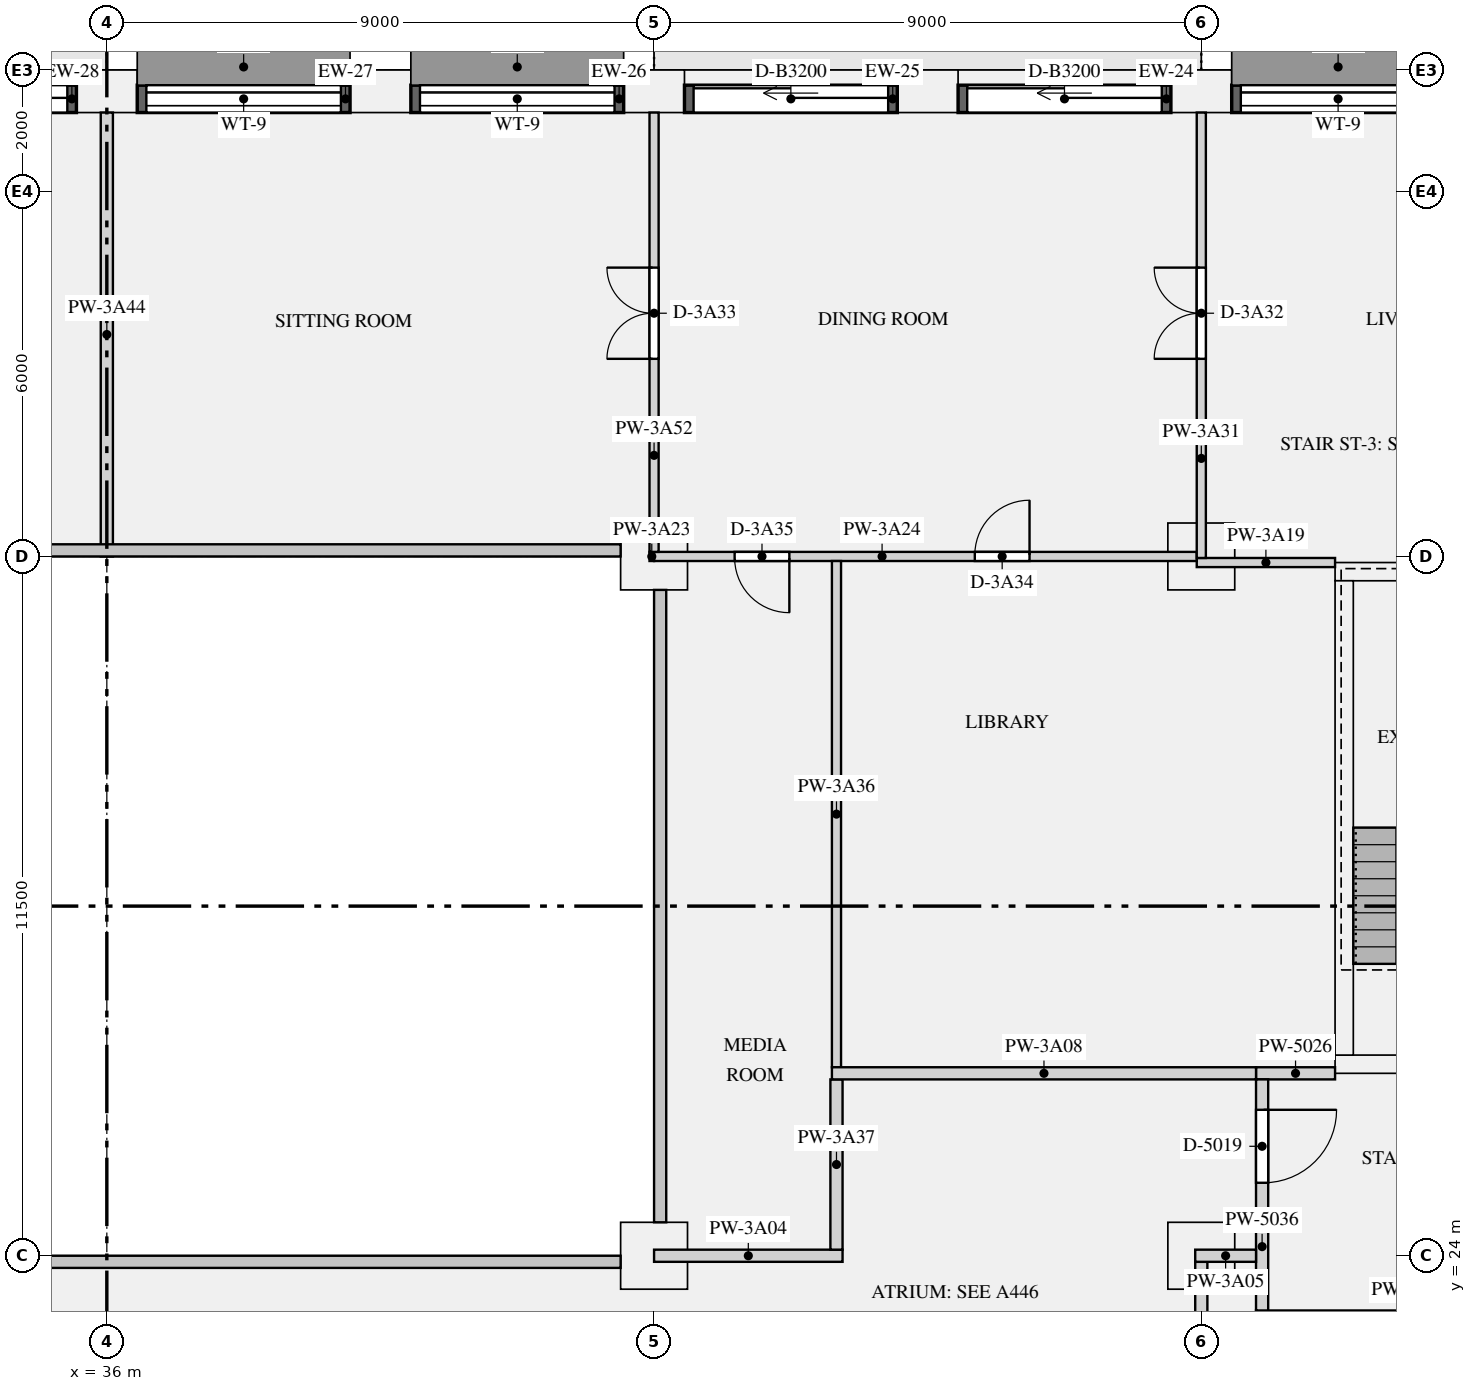
"""IFC4 building model, lengths in metres.
Left out: names, types, materials, properties, quantities, classifications, styles, units other than length and angle.
Written with IfcOpenShell. Run it as: python <this file> out.ifc"""

import sys

from ifc_helpers import new_model, si_unit, direction, frame, frame_2d, origin, origin_2d, place, context, subcontext, project, spatial, rectangle, extrude, element, fill, save


model = new_model("IFC4")
c1 = context("Model", 3, precision=1e-05, world=origin(), true_north=direction((0.0, 1.0)))
c2 = subcontext(c1, "Body", "Model", "MODEL_VIEW")
j1 = project(units=[si_unit("LENGTHUNIT", "METRE"), si_unit("PLANEANGLEUNIT", "RADIAN")], contexts=[c1])
p1 = place(None, origin())
s1 = spatial("IfcSite", under=j1, at=p1, CompositionType="ELEMENT")
p2 = place(p1, origin())
s2 = spatial("IfcBuilding", under=s1, at=p2, CompositionType="ELEMENT")
p3 = place(p2, frame((0.0, 0.0, 144.45)))
s3 = spatial("IfcBuildingStorey", under=s2, at=p3, CompositionType="ELEMENT", Elevation=144.45)
for number, where, z_axis, x_axis in (
    (1, (54.0, 43.15, 0.0), (0.0, 0.0, 1.0), (-1.0, 0.0, 0.0)),
    (2, (49.5, 43.15, 0.0), (0.0, 0.0, 1.0), (-1.0, 0.0, 0.0)),
    (3, (45.0, 43.15, 0.0), (0.0, 0.0, 1.0), (-1.0, 0.0, 0.0)),
    (4, (40.5, 43.15, 0.0), (0.0, 0.0, 1.0), (-1.0, 0.0, 0.0)),
    (5, (36.0, 43.15, 0.0), (0.0, 0.0, 1.0), (-1.0, 0.0, 0.0)),
):
    element("IfcColumn", number, at=place(p3, frame(where, z_axis=z_axis, x_axis=x_axis)), inside=s3, PredefinedType="USERDEFINED", context=c2, shape_type="SweptSolid", body=[
        extrude(rectangle(XDim=1.0, YDim=0.7, at=origin_2d()), origin(), (0.0, 0.0, 1.0), 3.15),
    ])
for number, where, z_axis, x_axis in (
    (6, (45.0, 24.0, 0.0), (0.0, 0.0, 1.0), (1.0, 0.0, 0.0)),
    (7, (54.0, 24.0, 0.0), (0.0, 0.0, 1.0), (1.0, 0.0, 0.0)),
    (8, (45.0, 35.5, 0.0), (0.0, 0.0, 1.0), (1.0, 0.0, 0.0)),
    (9, (54.0, 35.5, 0.0), (0.0, 0.0, 1.0), (1.0, 0.0, 0.0)),
):
    element("IfcColumn", number, at=place(p3, frame(where, z_axis=z_axis, x_axis=x_axis)), inside=s3, PredefinedType="COLUMN", context=c2, shape_type="SweptSolid", body=[
        extrude(rectangle(XDim=1.1, YDim=1.1, at=origin_2d()), origin(), (0.0, 0.0, 1.0), 3.15),
    ])
p4 = place(p3, frame((56.2, 27.15, 0.0), z_axis=(0.0, 0.0, 1.0), x_axis=(1.0, 0.0, 0.0)))
e10 = element("IfcWall", 10, at=p4, inside=s3, PredefinedType="SHEAR", context=c2, shape_type="SweptSolid", body=[
    extrude(rectangle(XDim=3.6, YDim=0.3, at=frame_2d((1.8, 0.0))), origin(), (0.0, 0.0, 1.0), 3.15),
])
p5 = place(p4, frame((1.25, 0.0, 0.0)))
e11 = element("IfcOpeningElement", 11, at=p5, cuts=e10, PredefinedType="OPENING", context=c2, shape_type="SweptSolid", body=[
    extrude(rectangle(XDim=1.1, YDim=2.1, at=frame_2d((0.55, 1.05))), frame((0.0, 0.16, 0.0), z_axis=(0.0, -1.0, 0.0), x_axis=(1.0, 0.0, 0.0)), (0.0, 0.0, 1.0), 0.32),
])
p6 = place(p3, frame((56.2, 35.25, 0.0), z_axis=(0.0, 0.0, 1.0), x_axis=(1.0, 0.0, 0.0)))
e12 = element("IfcWall", 12, at=p6, inside=s3, PredefinedType="SHEAR", context=c2, shape_type="SweptSolid", body=[
    extrude(rectangle(XDim=3.6, YDim=0.3, at=frame_2d((1.8, 0.0))), origin(), (0.0, 0.0, 1.0), 3.15),
])
p7 = place(p3, frame((56.35, 27.3, 0.0), z_axis=(0.0, 0.0, 1.0), x_axis=(0.0, 1.0, 0.0)))
e13 = element("IfcWall", 13, at=p7, inside=s3, PredefinedType="SHEAR", context=c2, shape_type="SweptSolid", body=[
    extrude(rectangle(XDim=7.8, YDim=0.3, at=frame_2d((3.9, 0.0))), origin(), (0.0, 0.0, 1.0), 3.15),
])
p8 = place(p3, frame((58.0, 43.025, 0.9), z_axis=(0.0, 0.0, 1.0), x_axis=(-1.0, 0.0, 0.0)))
e14 = element("IfcWall", 14, at=p8, inside=s3, PredefinedType="SOLIDWALL", context=c2, shape_type="SweptSolid", body=[
    extrude(rectangle(XDim=3.5, YDim=0.45, at=frame_2d((1.75, 0.0))), origin(), (0.0, 0.0, 1.0), 1.93),
])
p9 = place(p8, frame((0.15, 0.0, 0.15)))
e15 = element("IfcOpeningElement", 15, at=p9, cuts=e14, PredefinedType="OPENING", context=c2, shape_type="SweptSolid", body=[
    extrude(rectangle(XDim=3.2, YDim=1.5, at=frame_2d((1.6, 0.75))), frame((0.0, 0.235, 0.0), z_axis=(0.0, -1.0, 0.0), x_axis=(1.0, 0.0, 0.0)), (0.0, 0.0, 1.0), 0.47),
])
p10 = place(p3, frame((53.5, 43.025, 0.0), z_axis=(0.0, 0.0, 1.0), x_axis=(-1.0, 0.0, 0.0)))
e16 = element("IfcWall", 16, at=p10, inside=s3, PredefinedType="SOLIDWALL", context=c2, shape_type="SweptSolid", body=[
    extrude(rectangle(XDim=3.5, YDim=0.45, at=frame_2d((1.75, 0.0))), origin(), (0.0, 0.0, 1.0), 2.83),
])
p11 = place(p10, frame((0.15, 0.0, 0.0)))
e17 = element("IfcOpeningElement", 17, at=p11, cuts=e16, PredefinedType="OPENING", context=c2, shape_type="SweptSolid", body=[
    extrude(rectangle(XDim=3.2, YDim=2.3, at=frame_2d((1.6, 1.15))), frame((0.0, 0.235, 0.0), z_axis=(0.0, -1.0, 0.0), x_axis=(1.0, 0.0, 0.0)), (0.0, 0.0, 1.0), 0.47),
])
p12 = place(p3, frame((49.0, 43.025, 0.0), z_axis=(0.0, 0.0, 1.0), x_axis=(-1.0, 0.0, 0.0)))
e18 = element("IfcWall", 18, at=p12, inside=s3, PredefinedType="SOLIDWALL", context=c2, shape_type="SweptSolid", body=[
    extrude(rectangle(XDim=3.5, YDim=0.45, at=frame_2d((1.75, 0.0))), origin(), (0.0, 0.0, 1.0), 2.83),
])
p13 = place(p12, frame((0.15, 0.0, 0.0)))
e19 = element("IfcOpeningElement", 19, at=p13, cuts=e18, PredefinedType="OPENING", context=c2, shape_type="SweptSolid", body=[
    extrude(rectangle(XDim=3.2, YDim=2.3, at=frame_2d((1.6, 1.15))), frame((0.0, 0.235, 0.0), z_axis=(0.0, -1.0, 0.0), x_axis=(1.0, 0.0, 0.0)), (0.0, 0.0, 1.0), 0.47),
])
p14 = place(p3, frame((44.5, 43.025, 0.9), z_axis=(0.0, 0.0, 1.0), x_axis=(-1.0, 0.0, 0.0)))
e20 = element("IfcWall", 20, at=p14, inside=s3, PredefinedType="SOLIDWALL", context=c2, shape_type="SweptSolid", body=[
    extrude(rectangle(XDim=3.5, YDim=0.45, at=frame_2d((1.75, 0.0))), origin(), (0.0, 0.0, 1.0), 1.93),
])
p15 = place(p14, frame((0.15, 0.0, 0.15)))
e21 = element("IfcOpeningElement", 21, at=p15, cuts=e20, PredefinedType="OPENING", context=c2, shape_type="SweptSolid", body=[
    extrude(rectangle(XDim=3.2, YDim=1.5, at=frame_2d((1.6, 0.75))), frame((0.0, 0.235, 0.0), z_axis=(0.0, -1.0, 0.0), x_axis=(1.0, 0.0, 0.0)), (0.0, 0.0, 1.0), 0.47),
])
p16 = place(p3, frame((40.0, 43.025, 0.9), z_axis=(0.0, 0.0, 1.0), x_axis=(-1.0, 0.0, 0.0)))
e22 = element("IfcWall", 22, at=p16, inside=s3, PredefinedType="SOLIDWALL", context=c2, shape_type="SweptSolid", body=[
    extrude(rectangle(XDim=3.5, YDim=0.45, at=frame_2d((1.75, 0.0))), origin(), (0.0, 0.0, 1.0), 1.93),
])
p17 = place(p16, frame((0.15, 0.0, 0.15)))
e23 = element("IfcOpeningElement", 23, at=p17, cuts=e22, PredefinedType="OPENING", context=c2, shape_type="SweptSolid", body=[
    extrude(rectangle(XDim=3.2, YDim=1.5, at=frame_2d((1.6, 0.75))), frame((0.0, 0.235, 0.0), z_axis=(0.0, -1.0, 0.0), x_axis=(1.0, 0.0, 0.0)), (0.0, 0.0, 1.0), 0.47),
])
p18 = place(p3, frame((35.5, 43.025, 0.0), z_axis=(0.0, 0.0, 1.0), x_axis=(-1.0, 0.0, 0.0)))
e24 = element("IfcWall", 24, at=p18, inside=s3, PredefinedType="SOLIDWALL", context=c2, shape_type="SweptSolid", body=[
    extrude(rectangle(XDim=3.5, YDim=0.45, at=frame_2d((1.75, 0.0))), origin(), (0.0, 0.0, 1.0), 2.83),
])
p19 = place(p18, frame((0.15, 0.0, 0.0)))
e25 = element("IfcOpeningElement", 25, at=p19, cuts=e24, PredefinedType="OPENING", context=c2, shape_type="SweptSolid", body=[
    extrude(rectangle(XDim=3.2, YDim=2.3, at=frame_2d((1.6, 1.15))), frame((0.0, 0.235, 0.0), z_axis=(0.0, -1.0, 0.0), x_axis=(1.0, 0.0, 0.0)), (0.0, 0.0, 1.0), 0.47),
])
p20 = place(p3, frame((54.9, 27.0, 0.0), z_axis=(0.0, 0.0, 1.0), x_axis=(1.0, 0.0, 0.0)))
e26 = element("IfcWall", 26, at=p20, inside=s3, PredefinedType="PARTITIONING", context=c2, shape_type="SweptSolid", body=[
    extrude(rectangle(XDim=1.3, YDim=0.2, at=frame_2d((0.65, 0.0))), origin(), (0.0, 0.0, 1.0), 2.83),
])
p21 = place(p3, frame((55.0, 23.1, 0.0), z_axis=(0.0, 0.0, 1.0), x_axis=(0.0, 1.0, 0.0)))
e27 = element("IfcWall", 27, at=p21, inside=s3, PredefinedType="PARTITIONING", context=c2, shape_type="SweptSolid", body=[
    extrude(rectangle(XDim=3.8, YDim=0.2, at=frame_2d((1.9, 0.0))), origin(), (0.0, 0.0, 1.0), 2.83),
])
p22 = place(p21, frame((2.1, 0.0, 0.0)))
e28 = element("IfcOpeningElement", 28, at=p22, cuts=e27, PredefinedType="OPENING", context=c2, shape_type="SweptSolid", body=[
    extrude(rectangle(XDim=1.2, YDim=2.1, at=frame_2d((0.6, 1.05))), frame((0.0, 0.11, 0.0), z_axis=(0.0, -1.0, 0.0), x_axis=(1.0, 0.0, 0.0)), (0.0, 0.0, 1.0), 0.22),
])
p23 = place(p3, frame((45.0, 24.0, 0.0), z_axis=(0.0, 0.0, 1.0), x_axis=(1.0, 0.0, 0.0)))
e29 = element("IfcWall", 29, at=p23, inside=s3, PredefinedType="PARTITIONING", context=c2, shape_type="SweptSolid", body=[
    extrude(rectangle(XDim=3.1, YDim=0.2, at=frame_2d((1.55, 0.0))), origin(), (0.0, 0.0, 1.0), 2.83),
])
p24 = place(p3, frame((53.9, 24.0, 0.0), z_axis=(0.0, 0.0, 1.0), x_axis=(1.0, 0.0, 0.0)))
e30 = element("IfcWall", 30, at=p24, inside=s3, PredefinedType="PARTITIONING", context=c2, shape_type="SweptSolid", body=[
    extrude(rectangle(XDim=1.0, YDim=0.2, at=frame_2d((0.5, 0.0))), origin(), (0.0, 0.0, 1.0), 2.83),
])
p25 = place(p3, frame((47.925, 27.0, 0.0), z_axis=(0.0, 0.0, 1.0), x_axis=(1.0, 0.0, 0.0)))
e31 = element("IfcWall", 31, at=p25, inside=s3, PredefinedType="PARTITIONING", context=c2, shape_type="SweptSolid", body=[
    extrude(rectangle(XDim=6.975, YDim=0.2, at=frame_2d((3.487, 0.0))), origin(), (0.0, 0.0, 1.0), 2.83),
])
p26 = place(p3, frame((53.925, 35.4, 0.0), z_axis=(0.0, 0.0, 1.0), x_axis=(1.0, 0.0, 0.0)))
e32 = element("IfcWall", 32, at=p26, inside=s3, PredefinedType="PARTITIONING", context=c2, shape_type="SweptSolid", body=[
    extrude(rectangle(XDim=2.275, YDim=0.15, at=frame_2d((1.137, 0.0))), origin(), (0.0, 0.0, 1.0), 2.83),
])
p27 = place(p3, frame((44.925, 35.5, 0.0), z_axis=(0.0, 0.0, 1.0), x_axis=(1.0, 0.0, 0.0)))
e33 = element("IfcWall", 33, at=p27, inside=s3, PredefinedType="PARTITIONING", context=c2, shape_type="SweptSolid", body=[
    extrude(rectangle(XDim=0.075, YDim=0.15, at=frame_2d((0.038, 0.0))), origin(), (0.0, 0.0, 1.0), 2.83),
])
p28 = place(p3, frame((45.0, 35.5, 0.0), z_axis=(0.0, 0.0, 1.0), x_axis=(1.0, 0.0, 0.0)))
e34 = element("IfcWall", 34, at=p28, inside=s3, PredefinedType="PARTITIONING", context=c2, shape_type="SweptSolid", body=[
    extrude(rectangle(XDim=8.925, YDim=0.15, at=frame_2d((4.462, 0.0))), origin(), (0.0, 0.0, 1.0), 2.83),
])
p29 = place(p28, frame((5.275, 0.0, 0.0)))
e35 = element("IfcOpeningElement", 35, at=p29, cuts=e34, PredefinedType="OPENING", context=c2, shape_type="SweptSolid", body=[
    extrude(rectangle(XDim=0.9, YDim=2.1, at=frame_2d((0.45, 1.05))), frame((0.0, 0.085, 0.0), z_axis=(0.0, -1.0, 0.0), x_axis=(1.0, 0.0, 0.0)), (0.0, 0.0, 1.0), 0.17),
])
p30 = place(p28, frame((1.325, 0.0, 0.0)))
e36 = element("IfcOpeningElement", 36, at=p30, cuts=e34, PredefinedType="OPENING", context=c2, shape_type="SweptSolid", body=[
    extrude(rectangle(XDim=0.9, YDim=2.1, at=frame_2d((0.45, 1.05))), frame((0.0, 0.085, 0.0), z_axis=(0.0, -1.0, 0.0), x_axis=(1.0, 0.0, 0.0)), (0.0, 0.0, 1.0), 0.17),
])
p31 = place(p3, frame((54.0, 35.475, 0.0), z_axis=(0.0, 0.0, 1.0), x_axis=(0.0, 1.0, 0.0)))
e37 = element("IfcWall", 37, at=p31, inside=s3, PredefinedType="PARTITIONING", context=c2, shape_type="SweptSolid", body=[
    extrude(rectangle(XDim=7.325, YDim=0.15, at=frame_2d((3.663, 0.0))), origin(), (0.0, 0.0, 1.0), 2.83),
])
p32 = place(p31, frame((3.275, 0.0, 0.0)))
e38 = element("IfcOpeningElement", 38, at=p32, cuts=e37, PredefinedType="OPENING", context=c2, shape_type="SweptSolid", body=[
    extrude(rectangle(XDim=1.5, YDim=2.1, at=frame_2d((0.75, 1.05))), frame((0.0, 0.085, 0.0), z_axis=(0.0, -1.0, 0.0), x_axis=(1.0, 0.0, 0.0)), (0.0, 0.0, 1.0), 0.17),
])
p33 = place(p3, frame((54.0, 16.1, 0.0), z_axis=(0.0, 0.0, 1.0), x_axis=(0.0, 1.0, 0.0)))
e39 = element("IfcWall", 39, at=p33, inside=s3, PredefinedType="PARTITIONING", context=c2, shape_type="SweptSolid", body=[
    extrude(rectangle(XDim=7.8, YDim=0.2, at=frame_2d((3.9, 0.0))), origin(), (0.0, 0.0, 1.0), 2.83),
])
p34 = place(p33, frame((1.85, 0.0, 0.0)))
e40 = element("IfcOpeningElement", 40, at=p34, cuts=e39, PredefinedType="OPENING", context=c2, shape_type="SweptSolid", body=[
    extrude(rectangle(XDim=1.1, YDim=2.1, at=frame_2d((0.55, 1.05))), frame((0.0, 0.11, 0.0), z_axis=(0.0, -1.0, 0.0), x_axis=(1.0, 0.0, 0.0)), (0.0, 0.0, 1.0), 0.22),
])
p35 = place(p3, frame((48.0, 27.1, 0.0), z_axis=(0.0, 0.0, 1.0), x_axis=(0.0, 1.0, 0.0)))
e41 = element("IfcWall", 41, at=p35, inside=s3, PredefinedType="PARTITIONING", context=c2, shape_type="SweptSolid", body=[
    extrude(rectangle(XDim=8.325, YDim=0.15, at=frame_2d((4.163, 0.0))), origin(), (0.0, 0.0, 1.0), 2.83),
])
p36 = place(p3, frame((48.0, 24.1, 0.0), z_axis=(0.0, 0.0, 1.0), x_axis=(0.0, 1.0, 0.0)))
e42 = element("IfcWall", 42, at=p36, inside=s3, PredefinedType="PARTITIONING", context=c2, shape_type="SweptSolid", body=[
    extrude(rectangle(XDim=2.8, YDim=0.2, at=frame_2d((1.4, 0.0))), origin(), (0.0, 0.0, 1.0), 2.83),
])
p37 = place(p3, frame((36.0, 35.5, 0.0), z_axis=(0.0, 0.0, 1.0), x_axis=(0.0, 1.0, 0.0)))
e43 = element("IfcWall", 43, at=p37, inside=s3, PredefinedType="PARTITIONING", context=c2, shape_type="SweptSolid", body=[
    extrude(rectangle(XDim=7.3, YDim=0.2, at=frame_2d((3.65, 0.0))), origin(), (0.0, 0.0, 1.0), 2.83),
])
p38 = place(p3, frame((45.0, 35.575, 0.0), z_axis=(0.0, 0.0, 1.0), x_axis=(0.0, 1.0, 0.0)))
e44 = element("IfcWall", 44, at=p38, inside=s3, PredefinedType="PARTITIONING", context=c2, shape_type="SweptSolid", body=[
    extrude(rectangle(XDim=7.225, YDim=0.15, at=frame_2d((3.613, 0.0))), origin(), (0.0, 0.0, 1.0), 2.83),
])
p39 = place(p38, frame((3.175, 0.0, 0.0)))
e45 = element("IfcOpeningElement", 45, at=p39, cuts=e44, PredefinedType="OPENING", context=c2, shape_type="SweptSolid", body=[
    extrude(rectangle(XDim=1.5, YDim=2.1, at=frame_2d((0.75, 1.05))), frame((0.0, 0.085, 0.0), z_axis=(0.0, -1.0, 0.0), x_axis=(1.0, 0.0, 0.0)), (0.0, 0.0, 1.0), 0.17),
])
p40 = place(p9, origin())
e46 = element("IfcWindow", 46, at=p40, inside=s3, PartitioningType="SINGLE_PANEL", PredefinedType="WINDOW", context=c2, shape_type="SweptSolid", body=[
    extrude(rectangle(XDim=3.2, YDim=1.5, at=frame_2d((1.6, 0.75))), frame((0.0, -0.065, 0.0), z_axis=(0.0, -1.0, 0.0), x_axis=(1.0, 0.0, 0.0)), (0.0, 0.0, 1.0), 0.06),
])
fill(e15, e46)
p41 = place(p11, origin())
e47 = element("IfcDoor", 47, at=p41, inside=s3, OperationType="SLIDING_TO_LEFT", PredefinedType="DOOR", context=c2, shape_type="SweptSolid", body=[
    extrude(rectangle(XDim=3.2, YDim=2.3, at=frame_2d((1.6, 1.15))), frame((0.0, -0.07, 0.0), z_axis=(0.0, -1.0, 0.0), x_axis=(1.0, 0.0, 0.0)), (0.0, 0.0, 1.0), 0.05),
])
fill(e17, e47)
p42 = place(p13, origin())
e48 = element("IfcDoor", 48, at=p42, inside=s3, OperationType="SLIDING_TO_LEFT", PredefinedType="DOOR", context=c2, shape_type="SweptSolid", body=[
    extrude(rectangle(XDim=3.2, YDim=2.3, at=frame_2d((1.6, 1.15))), frame((0.0, -0.07, 0.0), z_axis=(0.0, -1.0, 0.0), x_axis=(1.0, 0.0, 0.0)), (0.0, 0.0, 1.0), 0.05),
])
fill(e19, e48)
p43 = place(p15, origin())
e49 = element("IfcWindow", 49, at=p43, inside=s3, PartitioningType="SINGLE_PANEL", PredefinedType="WINDOW", context=c2, shape_type="SweptSolid", body=[
    extrude(rectangle(XDim=3.2, YDim=1.5, at=frame_2d((1.6, 0.75))), frame((0.0, -0.065, 0.0), z_axis=(0.0, -1.0, 0.0), x_axis=(1.0, 0.0, 0.0)), (0.0, 0.0, 1.0), 0.06),
])
fill(e21, e49)
p44 = place(p17, origin())
e50 = element("IfcWindow", 50, at=p44, inside=s3, PartitioningType="SINGLE_PANEL", PredefinedType="WINDOW", context=c2, shape_type="SweptSolid", body=[
    extrude(rectangle(XDim=3.2, YDim=1.5, at=frame_2d((1.6, 0.75))), frame((0.0, -0.065, 0.0), z_axis=(0.0, -1.0, 0.0), x_axis=(1.0, 0.0, 0.0)), (0.0, 0.0, 1.0), 0.06),
])
fill(e23, e50)
p45 = place(p19, origin())
e51 = element("IfcDoor", 51, at=p45, inside=s3, OperationType="SLIDING_TO_LEFT", PredefinedType="DOOR", context=c2, shape_type="SweptSolid", body=[
    extrude(rectangle(XDim=3.2, YDim=2.3, at=frame_2d((1.6, 1.15))), frame((0.0, -0.07, 0.0), z_axis=(0.0, -1.0, 0.0), x_axis=(1.0, 0.0, 0.0)), (0.0, 0.0, 1.0), 0.05),
])
fill(e25, e51)
p46 = place(p22, frame((1.2, 0.0, 0.0), z_axis=(0.0, 0.0, 1.0), x_axis=(-1.0, 0.0, 0.0)))
e52 = element("IfcDoor", 52, at=p46, inside=s3, OperationType="SINGLE_SWING_LEFT", PredefinedType="DOOR", context=c2, shape_type="SweptSolid", body=[
    extrude(rectangle(XDim=1.2, YDim=2.1, at=frame_2d((0.6, 1.05))), frame((0.0, 0.025, 0.0), z_axis=(0.0, -1.0, 0.0), x_axis=(1.0, 0.0, 0.0)), (0.0, 0.0, 1.0), 0.05),
])
fill(e28, e52)
p47 = place(p32, origin())
e53 = element("IfcDoor", 53, at=p47, inside=s3, OperationType="DOUBLE_DOOR_SINGLE_SWING", PredefinedType="DOOR", context=c2, shape_type="SweptSolid", body=[
    extrude(rectangle(XDim=1.5, YDim=2.1, at=frame_2d((0.75, 1.05))), frame((0.0, 0.025, 0.0), z_axis=(0.0, -1.0, 0.0), x_axis=(1.0, 0.0, 0.0)), (0.0, 0.0, 1.0), 0.05),
])
fill(e38, e53)
p48 = place(p39, origin())
e54 = element("IfcDoor", 54, at=p48, inside=s3, OperationType="DOUBLE_DOOR_SINGLE_SWING", PredefinedType="DOOR", context=c2, shape_type="SweptSolid", body=[
    extrude(rectangle(XDim=1.5, YDim=2.1, at=frame_2d((0.75, 1.05))), frame((0.0, 0.025, 0.0), z_axis=(0.0, -1.0, 0.0), x_axis=(1.0, 0.0, 0.0)), (0.0, 0.0, 1.0), 0.05),
])
fill(e45, e54)
p49 = place(p29, origin())
e55 = element("IfcDoor", 55, at=p49, inside=s3, OperationType="SINGLE_SWING_RIGHT", PredefinedType="DOOR", context=c2, shape_type="SweptSolid", body=[
    extrude(rectangle(XDim=0.9, YDim=2.1, at=frame_2d((0.45, 1.05))), frame((0.0, 0.025, 0.0), z_axis=(0.0, -1.0, 0.0), x_axis=(1.0, 0.0, 0.0)), (0.0, 0.0, 1.0), 0.05),
])
fill(e35, e55)
p50 = place(p30, frame((0.9, 0.0, 0.0), z_axis=(0.0, 0.0, 1.0), x_axis=(-1.0, 0.0, 0.0)))
e56 = element("IfcDoor", 56, at=p50, inside=s3, OperationType="SINGLE_SWING_LEFT", PredefinedType="DOOR", context=c2, shape_type="SweptSolid", body=[
    extrude(rectangle(XDim=0.9, YDim=2.1, at=frame_2d((0.45, 1.05))), frame((0.0, 0.025, 0.0), z_axis=(0.0, -1.0, 0.0), x_axis=(1.0, 0.0, 0.0)), (0.0, 0.0, 1.0), 0.05),
])
fill(e36, e56)
save(model, sys.argv[1])
